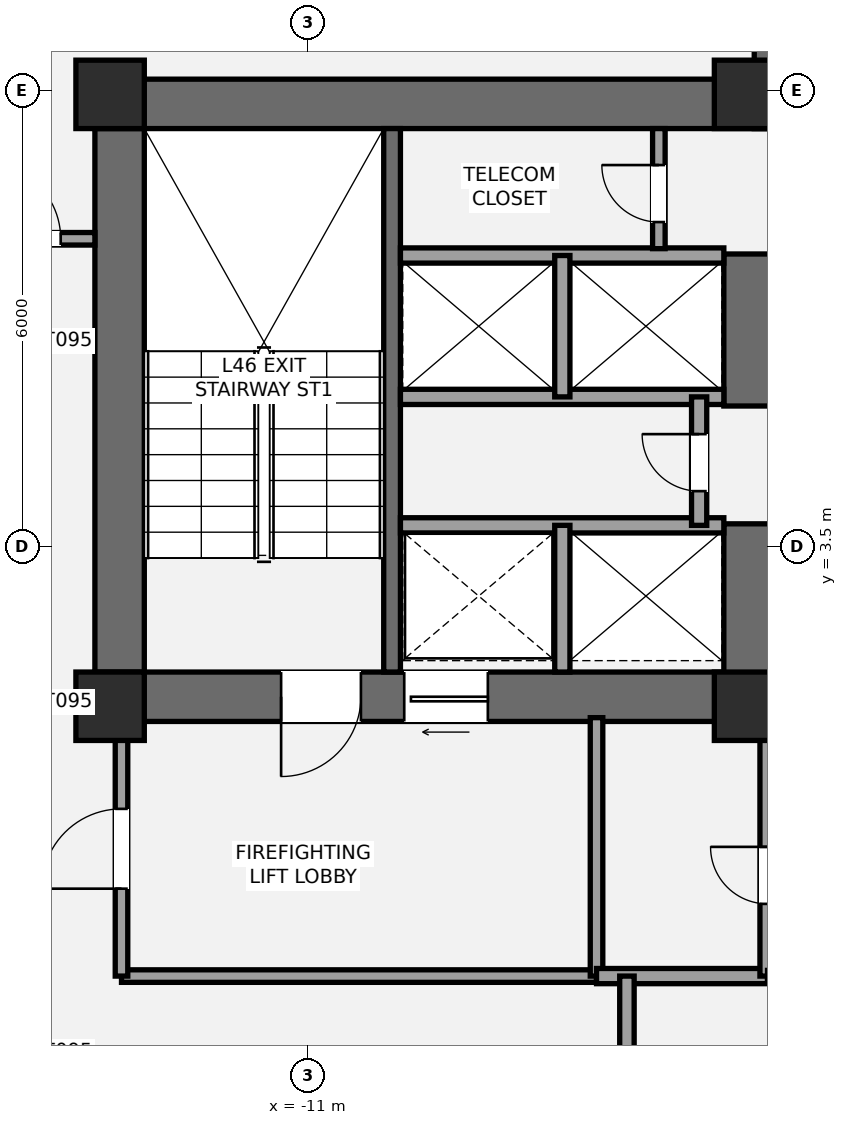
"""IFC4 building model, lengths in metres.
Left out: names, types, materials, properties, quantities, classifications, styles, units other than length and angle.
Written with IfcOpenShell. Run it as: python <this file> out.ifc"""

import sys

from ifc_helpers import new_model, si_unit, direction, frame, frame_2d, origin, origin_2d, place, context, subcontext, project, spatial, rectangle, extrude, element, fill, save


model = new_model("IFC4")
c1 = context("Model", 3, precision=1e-05, world=origin(), true_north=direction((0.0, 1.0)))
c2 = subcontext(c1, "Body", "Model", "MODEL_VIEW")
j1 = project(units=[si_unit("LENGTHUNIT", "METRE"), si_unit("PLANEANGLEUNIT", "RADIAN")], contexts=[c1])
p1 = place(None, origin())
s1 = spatial("IfcSite", under=j1, at=p1, CompositionType="ELEMENT")
p2 = place(p1, origin())
s2 = spatial("IfcBuilding", under=s1, at=p2, CompositionType="ELEMENT")
p3 = place(p2, frame((0.0, 0.0, 169.4)))
s3 = spatial("IfcBuildingStorey", under=s2, at=p3, CompositionType="ELEMENT", Elevation=169.4)
p4 = place(p3, frame((-13.475, 1.2, 0.0), z_axis=(0.0, 0.0, 1.0), x_axis=(0.0, 1.0, 0.0)))
e1 = element("IfcWall", 1, at=p4, inside=s3, PredefinedType="SHEAR", context=c2, shape_type="SweptSolid", body=[
    extrude(rectangle(XDim=8.45, YDim=0.65, at=frame_2d((4.225, 0.0))), origin(), (0.0, 0.0, 1.0), 3.2),
])
p5 = place(p3, frame((-13.8, 9.325, 0.0), z_axis=(0.0, 0.0, 1.0), x_axis=(1.0, 0.0, 0.0)))
e2 = element("IfcWall", 2, at=p5, inside=s3, PredefinedType="SHEAR", context=c2, shape_type="SweptSolid", body=[
    extrude(rectangle(XDim=9.325, YDim=0.65, at=frame_2d((4.663, 0.0))), origin(), (0.0, 0.0, 1.0), 3.2),
])
p6 = place(p3, frame((-4.875, 1.525, 0.0), z_axis=(0.0, 0.0, 1.0), x_axis=(-1.0, 0.0, 0.0)))
e3 = element("IfcWall", 3, at=p6, inside=s3, PredefinedType="SHEAR", context=c2, shape_type="SweptSolid", body=[
    extrude(rectangle(XDim=8.925, YDim=0.65, at=frame_2d((4.462, 0.0))), origin(), (0.0, 0.0, 1.0), 3.2),
])
p7 = place(p6, frame((5.425, 0.0, 0.0)))
e4 = element("IfcOpeningElement", 4, at=p7, cuts=e3, PredefinedType="OPENING", context=c2, shape_type="SweptSolid", body=[
    extrude(rectangle(XDim=1.05, YDim=2.15, at=frame_2d((0.525, 1.075))), frame((0.0, 0.335, 0.0), z_axis=(0.0, -1.0, 0.0), x_axis=(1.0, 0.0, 0.0)), (0.0, 0.0, 1.0), 0.67),
])
p8 = place(p6, frame((3.755, 0.0, 0.0)))
e5 = element("IfcOpeningElement", 5, at=p8, cuts=e3, PredefinedType="OPENING", context=c2, shape_type="SweptSolid", body=[
    extrude(rectangle(XDim=1.1, YDim=2.2, at=frame_2d((0.55, 1.1))), frame((0.0, 0.335, 0.0), z_axis=(0.0, -1.0, 0.0), x_axis=(1.0, 0.0, 0.0)), (0.0, 0.0, 1.0), 0.67),
])
p9 = place(p3, frame((-5.2, 1.2, 0.0), z_axis=(0.0, 0.0, 1.0), x_axis=(0.0, 1.0, 0.0)))
e6 = element("IfcWall", 6, at=p9, inside=s3, PredefinedType="SHEAR", context=c2, shape_type="SweptSolid", body=[
    extrude(rectangle(XDim=2.6, YDim=0.65, at=frame_2d((1.3, 0.0))), origin(), (0.0, 0.0, 1.0), 3.2),
])
p10 = place(p3, frame((-5.2, 5.35, 0.0), z_axis=(0.0, 0.0, 1.0), x_axis=(0.0, 1.0, 0.0)))
e7 = element("IfcWall", 7, at=p10, inside=s3, PredefinedType="SHEAR", context=c2, shape_type="SweptSolid", body=[
    extrude(rectangle(XDim=2.0, YDim=0.65, at=frame_2d((1.0, 0.0))), origin(), (0.0, 0.0, 1.0), 3.2),
])
p11 = place(p3, frame((-9.89, 1.85, 0.0), z_axis=(0.0, 0.0, 1.0), x_axis=(0.0, 1.0, 0.0)))
e8 = element("IfcWall", 8, at=p11, inside=s3, PredefinedType="SHEAR", context=c2, shape_type="SweptSolid", body=[
    extrude(rectangle(XDim=7.15, YDim=0.22, at=frame_2d((3.575, 0.0))), origin(), (0.0, 0.0, 1.0), 3.2),
])
p12 = place(p3, frame((-4.8, 9.0, 0.0), z_axis=(0.0, 0.0, 1.0), x_axis=(0.0, 1.0, 0.0)))
e9 = element("IfcWall", 9, at=p12, inside=s3, PredefinedType="SHEAR", context=c2, shape_type="SweptSolid", body=[
    extrude(rectangle(XDim=4.05, YDim=0.65, at=frame_2d((2.025, 0.0))), origin(), (0.0, 0.0, 1.0), 3.2),
])
for number, where, z_axis, x_axis in (
    (10, (-13.6, 1.4, 0.0), (0.0, 0.0, 1.0), (1.0, 0.0, 0.0)),
    (11, (-13.6, 9.45, 0.0), (0.0, 0.0, 1.0), (1.0, 0.0, 0.0)),
    (12, (-5.2, 1.4, 0.0), (0.0, 0.0, 1.0), (1.0, 0.0, 0.0)),
    (13, (-5.2, 9.45, 0.0), (0.0, 0.0, 1.0), (1.0, 0.0, 0.0)),
):
    element("IfcColumn", number, at=place(p3, frame(where, z_axis=z_axis, x_axis=x_axis)), inside=s3, PredefinedType="COLUMN", context=c2, shape_type="SweptSolid", body=[
        extrude(rectangle(XDim=0.9, YDim=0.9, at=origin_2d()), origin(), (0.0, 0.0, 1.0), 3.2),
    ])
p13 = place(p3, frame((-13.45, -2.15, 0.0), z_axis=(0.0, 0.0, 1.0), x_axis=(1.0, 0.0, 0.0)))
e14 = element("IfcWall", 14, at=p13, inside=s3, PredefinedType="PARTITIONING", context=c2, shape_type="SweptSolid", body=[
    extrude(rectangle(XDim=6.25, YDim=0.165, at=frame_2d((3.125, 0.0))), origin(), (0.0, 0.0, 1.0), 2.473),
])
p14 = place(p3, frame((-13.45, -2.15, 0.0), z_axis=(0.0, 0.0, 1.0), x_axis=(0.0, 1.0, 0.0)))
e15 = element("IfcWall", 15, at=p14, inside=s3, PredefinedType="PARTITIONING", context=c2, shape_type="SweptSolid", body=[
    extrude(rectangle(XDim=3.4, YDim=0.165, at=frame_2d((1.7, 0.0))), origin(), (0.0, 0.0, 1.0), 2.473),
])
p15 = place(p14, frame((1.15, 0.0, 0.0)))
e16 = element("IfcOpeningElement", 16, at=p15, cuts=e15, PredefinedType="OPENING", context=c2, shape_type="SweptSolid", body=[
    extrude(rectangle(XDim=1.05, YDim=2.15, at=frame_2d((0.525, 1.075))), frame((0.0, 0.093, 0.0), z_axis=(0.0, -1.0, 0.0), x_axis=(1.0, 0.0, 0.0)), (0.0, 0.0, 1.0), 0.185),
])
p16 = place(p3, frame((-7.2, -2.15, 0.0), z_axis=(0.0, 0.0, 1.0), x_axis=(0.0, 1.0, 0.0)))
e17 = element("IfcWall", 17, at=p16, inside=s3, PredefinedType="PARTITIONING", context=c2, shape_type="SweptSolid", body=[
    extrude(rectangle(XDim=3.4, YDim=0.165, at=frame_2d((1.7, 0.0))), origin(), (0.0, 0.0, 1.0), 2.473),
])
p17 = place(p3, frame((-7.2, -2.15, 0.0), z_axis=(0.0, 0.0, 1.0), x_axis=(1.0, 0.0, 0.0)))
e18 = element("IfcWall", 18, at=p17, inside=s3, PredefinedType="SOLIDWALL", context=c2, shape_type="SweptSolid", body=[
    extrude(rectangle(XDim=2.25, YDim=0.2, at=frame_2d((1.125, 0.0))), origin(), (0.0, 0.0, 1.0), 3.02),
])
p18 = place(p3, frame((-4.95, -2.15, 0.0), z_axis=(0.0, 0.0, 1.0), x_axis=(0.0, 1.0, 0.0)))
e19 = element("IfcWall", 19, at=p18, inside=s3, PredefinedType="SOLIDWALL", context=c2, shape_type="SweptSolid", body=[
    extrude(rectangle(XDim=3.4, YDim=0.2, at=frame_2d((1.7, 0.0))), origin(), (0.0, 0.0, 1.0), 2.473),
])
p19 = place(p18, frame((0.95, 0.0, 0.0)))
e20 = element("IfcOpeningElement", 20, at=p19, cuts=e19, PredefinedType="OPENING", context=c2, shape_type="SweptSolid", body=[
    extrude(rectangle(XDim=0.75, YDim=2.1, at=frame_2d((0.375, 1.05))), frame((0.0, 0.11, 0.0), z_axis=(0.0, -1.0, 0.0), x_axis=(1.0, 0.0, 0.0)), (0.0, 0.0, 1.0), 0.22),
])
p20 = place(p3, frame((-9.78, 3.78, 0.0), z_axis=(0.0, 0.0, 1.0), x_axis=(1.0, 0.0, 0.0)))
e21 = element("IfcWall", 21, at=p20, inside=s3, PredefinedType="SOLIDWALL", context=c2, shape_type="SweptSolid", body=[
    extrude(rectangle(XDim=4.255, YDim=0.2, at=frame_2d((2.127, 0.0))), origin(), (0.0, 0.0, 1.0), 3.02),
])
p21 = place(p3, frame((-7.65, 1.85, 0.0), z_axis=(0.0, 0.0, 1.0), x_axis=(0.0, 1.0, 0.0)))
e22 = element("IfcWall", 22, at=p21, inside=s3, PredefinedType="SOLIDWALL", context=c2, shape_type="SweptSolid", body=[
    extrude(rectangle(XDim=1.93, YDim=0.2, at=frame_2d((0.965, 0.0))), origin(), (0.0, 0.0, 1.0), 3.02),
])
for number, where, z_axis, x_axis in (
    (23, (-9.78, 5.47, 0.0), (0.0, 0.0, 1.0), (1.0, 0.0, 0.0)),
    (24, (-9.78, 7.33, 0.0), (0.0, 0.0, 1.0), (1.0, 0.0, 0.0)),
):
    element("IfcWall", number, at=place(p3, frame(where, z_axis=z_axis, x_axis=x_axis)), inside=s3, PredefinedType="SOLIDWALL", context=c2, shape_type="SweptSolid", body=[
        extrude(rectangle(XDim=4.255, YDim=0.2, at=frame_2d((2.127, 0.0))), origin(), (0.0, 0.0, 1.0), 3.02),
    ])
p22 = place(p3, frame((-7.65, 5.47, 0.0), z_axis=(0.0, 0.0, 1.0), x_axis=(0.0, 1.0, 0.0)))
e25 = element("IfcWall", 25, at=p22, inside=s3, PredefinedType="SOLIDWALL", context=c2, shape_type="SweptSolid", body=[
    extrude(rectangle(XDim=1.86, YDim=0.2, at=frame_2d((0.93, 0.0))), origin(), (0.0, 0.0, 1.0), 3.02),
])
p23 = place(p3, frame((-5.85, 3.78, 0.0), z_axis=(0.0, 0.0, 1.0), x_axis=(0.0, 1.0, 0.0)))
e26 = element("IfcWall", 26, at=p23, inside=s3, PredefinedType="SOLIDWALL", context=c2, shape_type="SweptSolid", body=[
    extrude(rectangle(XDim=1.69, YDim=0.2, at=frame_2d((0.845, 0.0))), origin(), (0.0, 0.0, 1.0), 3.02),
])
p24 = place(p23, frame((0.45, 0.0, 0.0)))
e27 = element("IfcOpeningElement", 27, at=p24, cuts=e26, PredefinedType="OPENING", context=c2, shape_type="SweptSolid", body=[
    extrude(rectangle(XDim=0.75, YDim=2.1, at=frame_2d((0.375, 1.05))), frame((0.0, 0.11, 0.0), z_axis=(0.0, -1.0, 0.0), x_axis=(1.0, 0.0, 0.0)), (0.0, 0.0, 1.0), 0.22),
])
p25 = place(p3, frame((-6.38, 7.42, 0.0), z_axis=(0.0, 0.0, 1.0), x_axis=(0.0, 1.0, 0.0)))
e28 = element("IfcWall", 28, at=p25, inside=s3, PredefinedType="PARTITIONING", context=c2, shape_type="SweptSolid", body=[
    extrude(rectangle(XDim=1.58, YDim=0.165, at=frame_2d((0.79, 0.0))), origin(), (0.0, 0.0, 1.0), 3.02),
])
p26 = place(p25, frame((0.35, 0.0, 0.0)))
e29 = element("IfcOpeningElement", 29, at=p26, cuts=e28, PredefinedType="OPENING", context=c2, shape_type="SweptSolid", body=[
    extrude(rectangle(XDim=0.75, YDim=2.1, at=frame_2d((0.375, 1.05))), frame((0.0, 0.093, 0.0), z_axis=(0.0, -1.0, 0.0), x_axis=(1.0, 0.0, 0.0)), (0.0, 0.0, 1.0), 0.185),
])
p27 = place(p3, frame((-6.8, -4.05, 0.0), z_axis=(0.0, 0.0, 1.0), x_axis=(0.0, 1.0, 0.0)))
e30 = element("IfcWall", 30, at=p27, inside=s3, PredefinedType="PLUMBINGWALL", context=c2, shape_type="SweptSolid", body=[
    extrude(rectangle(XDim=1.9, YDim=0.19, at=frame_2d((0.95, 0.0))), origin(), (0.0, 0.0, 1.0), 2.473),
])
p28 = place(p3, frame((-15.55, 7.55, 0.0), z_axis=(0.0, 0.0, 1.0), x_axis=(1.0, 0.0, 0.0)))
e31 = element("IfcWall", 31, at=p28, inside=s3, PredefinedType="PARTITIONING", context=c2, shape_type="SweptSolid", body=[
    extrude(rectangle(XDim=1.75, YDim=0.165, at=frame_2d((0.875, 0.0))), origin(), (0.0, 0.0, 1.0), 3.02),
])
p29 = place(p28, frame((0.3, 0.0, 0.0)))
e32 = element("IfcOpeningElement", 32, at=p29, cuts=e31, PredefinedType="OPENING", context=c2, shape_type="SweptSolid", body=[
    extrude(rectangle(XDim=1.0, YDim=2.15, at=frame_2d((0.5, 1.075))), frame((0.0, 0.093, 0.0), z_axis=(0.0, -1.0, 0.0), x_axis=(1.0, 0.0, 0.0)), (0.0, 0.0, 1.0), 0.185),
])
p30 = place(p7, origin())
e33 = element("IfcDoor", 33, at=p30, inside=s3, OperationType="SINGLE_SWING_RIGHT", PredefinedType="DOOR", context=c2, shape_type="SweptSolid", body=[
    extrude(rectangle(XDim=1.05, YDim=2.15, at=frame_2d((0.525, 1.075))), frame((0.0, 0.025, 0.0), z_axis=(0.0, -1.0, 0.0), x_axis=(1.0, 0.0, 0.0)), (0.0, 0.0, 1.0), 0.05),
])
fill(e4, e33)
p31 = place(p15, origin())
e34 = element("IfcDoor", 34, at=p31, inside=s3, OperationType="SINGLE_SWING_LEFT", PredefinedType="DOOR", context=c2, shape_type="SweptSolid", body=[
    extrude(rectangle(XDim=1.05, YDim=2.15, at=frame_2d((0.525, 1.075))), frame((0.0, 0.025, 0.0), z_axis=(0.0, -1.0, 0.0), x_axis=(1.0, 0.0, 0.0)), (0.0, 0.0, 1.0), 0.05),
])
fill(e16, e34)
p32 = place(p19, origin())
e35 = element("IfcDoor", 35, at=p32, inside=s3, OperationType="SINGLE_SWING_RIGHT", PredefinedType="DOOR", context=c2, shape_type="SweptSolid", body=[
    extrude(rectangle(XDim=0.75, YDim=2.1, at=frame_2d((0.375, 1.05))), frame((0.0, 0.025, 0.0), z_axis=(0.0, -1.0, 0.0), x_axis=(1.0, 0.0, 0.0)), (0.0, 0.0, 1.0), 0.05),
])
fill(e20, e35)
p33 = place(p8, origin())
e36 = element("IfcDoor", 36, at=p33, inside=s3, OperationType="SLIDING_TO_LEFT", PredefinedType="DOOR", context=c2, shape_type="SweptSolid", body=[
    extrude(rectangle(XDim=1.1, YDim=2.2, at=frame_2d((0.55, 1.1))), frame((0.0, 0.025, 0.0), z_axis=(0.0, -1.0, 0.0), x_axis=(1.0, 0.0, 0.0)), (0.0, 0.0, 1.0), 0.05),
])
fill(e5, e36)
p34 = place(p24, origin())
e37 = element("IfcDoor", 37, at=p34, inside=s3, OperationType="SINGLE_SWING_RIGHT", PredefinedType="DOOR", context=c2, shape_type="SweptSolid", body=[
    extrude(rectangle(XDim=0.75, YDim=2.1, at=frame_2d((0.375, 1.05))), frame((0.0, 0.025, 0.0), z_axis=(0.0, -1.0, 0.0), x_axis=(1.0, 0.0, 0.0)), (0.0, 0.0, 1.0), 0.05),
])
fill(e27, e37)
p35 = place(p26, origin())
e38 = element("IfcDoor", 38, at=p35, inside=s3, OperationType="SINGLE_SWING_RIGHT", PredefinedType="DOOR", context=c2, shape_type="SweptSolid", body=[
    extrude(rectangle(XDim=0.75, YDim=2.1, at=frame_2d((0.375, 1.05))), frame((0.0, 0.025, 0.0), z_axis=(0.0, -1.0, 0.0), x_axis=(1.0, 0.0, 0.0)), (0.0, 0.0, 1.0), 0.05),
])
fill(e29, e38)
p36 = place(p29, origin())
e39 = element("IfcDoor", 39, at=p36, inside=s3, OperationType="SINGLE_SWING_LEFT", PredefinedType="DOOR", context=c2, shape_type="SweptSolid", body=[
    extrude(rectangle(XDim=1.0, YDim=2.15, at=frame_2d((0.5, 1.075))), frame((0.0, 0.025, 0.0), z_axis=(0.0, -1.0, 0.0), x_axis=(1.0, 0.0, 0.0)), (0.0, 0.0, 1.0), 0.05),
])
fill(e32, e39)
save(model, sys.argv[1])
